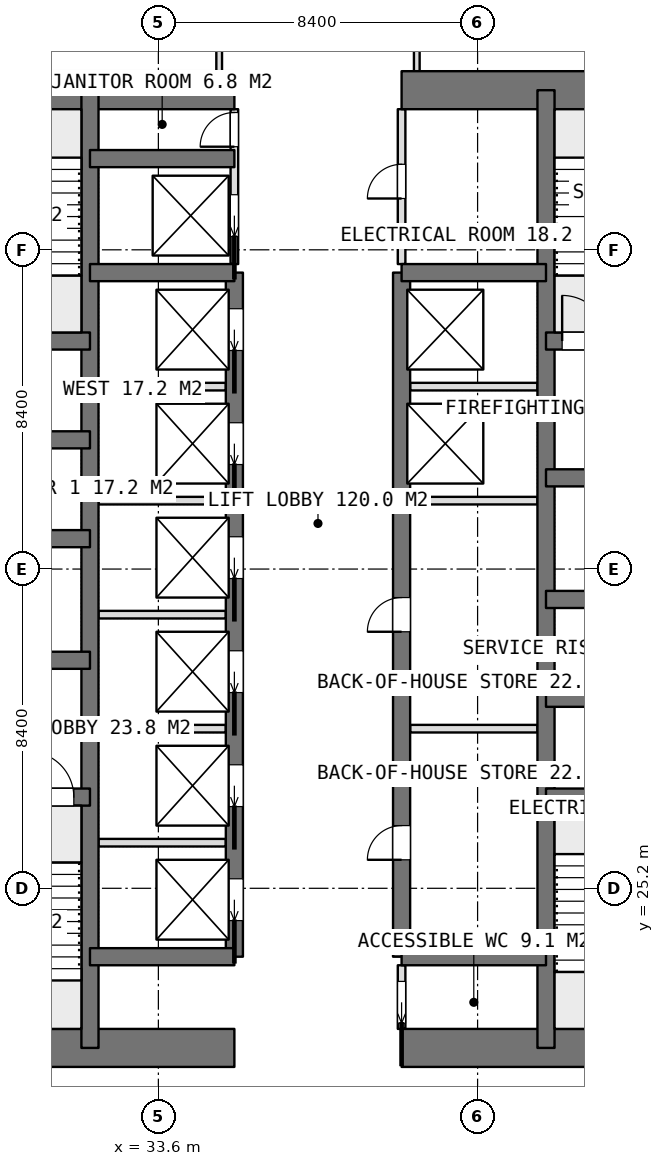
"""IFC4 building model, lengths in metres.
Left out: names, types, materials, properties, quantities, classifications, styles, units other than length and angle.
Written with IfcOpenShell. Run it as: python <this file> out.ifc"""

import sys

from ifc_helpers import new_model, si_unit, direction, frame, frame_2d, origin, place, context, subcontext, project, spatial, rectangle, extrude, element, fill, save


model = new_model("IFC4")
c1 = context("Model", 3, precision=1e-05, world=origin(), true_north=direction((0.0, 1.0)))
c2 = subcontext(c1, "Body", "Model", "MODEL_VIEW")
j1 = project(units=[si_unit("LENGTHUNIT", "METRE"), si_unit("PLANEANGLEUNIT", "RADIAN")], contexts=[c1])
p1 = place(None, origin())
s1 = spatial("IfcSite", under=j1, at=p1, CompositionType="ELEMENT")
p2 = place(p1, origin())
s2 = spatial("IfcBuilding", under=s1, at=p2, CompositionType="ELEMENT")
p3 = place(p2, frame((0.0, 0.0, 195.2)))
s3 = spatial("IfcBuildingStorey", under=s2, at=p3, CompositionType="ELEMENT", Elevation=195.2)
p4 = place(p3, frame((25.2, 21.0, 0.0), z_axis=(0.0, 0.0, 1.0), x_axis=(1.0, 0.0, 0.0)))
e1 = element("IfcWall", 1, at=p4, inside=s3, PredefinedType="SHEAR", context=c2, shape_type="SweptSolid", body=[
    extrude(rectangle(XDim=10.4, YDim=1.0, at=frame_2d((5.2, 0.0))), origin(), (0.0, 0.0, 1.0), 3.75),
])
p5 = place(p3, frame((40.0, 21.0, 0.0), z_axis=(0.0, 0.0, 1.0), x_axis=(1.0, 0.0, 0.0)))
e2 = element("IfcWall", 2, at=p5, inside=s3, PredefinedType="SHEAR", context=c2, shape_type="SweptSolid", body=[
    extrude(rectangle(XDim=10.4, YDim=1.0, at=frame_2d((5.2, 0.0))), origin(), (0.0, 0.0, 1.0), 3.75),
])
p6 = place(p3, frame((25.2, 46.2, 0.0), z_axis=(0.0, 0.0, 1.0), x_axis=(1.0, 0.0, 0.0)))
e3 = element("IfcWall", 3, at=p6, inside=s3, PredefinedType="SHEAR", context=c2, shape_type="SweptSolid", body=[
    extrude(rectangle(XDim=10.4, YDim=1.0, at=frame_2d((5.2, 0.0))), origin(), (0.0, 0.0, 1.0), 3.75),
])
p7 = place(p3, frame((40.0, 46.2, 0.0), z_axis=(0.0, 0.0, 1.0), x_axis=(1.0, 0.0, 0.0)))
e4 = element("IfcWall", 4, at=p7, inside=s3, PredefinedType="SHEAR", context=c2, shape_type="SweptSolid", body=[
    extrude(rectangle(XDim=10.4, YDim=1.0, at=frame_2d((5.2, 0.0))), origin(), (0.0, 0.0, 1.0), 3.75),
])
for number, where, z_axis, x_axis in (
    (5, (31.8, 21.0, 0.0), (0.0, 0.0, 1.0), (0.0, 1.0, 0.0)),
    (6, (43.8, 21.0, 0.0), (0.0, 0.0, 1.0), (0.0, 1.0, 0.0)),
):
    element("IfcWall", number, at=place(p3, frame(where, z_axis=z_axis, x_axis=x_axis)), inside=s3, PredefinedType="SHEAR", context=c2, shape_type="SweptSolid", body=[
        extrude(rectangle(XDim=25.2, YDim=0.45, at=frame_2d((12.6, 0.0))), origin(), (0.0, 0.0, 1.0), 3.75),
    ])
p8 = place(p3, frame((35.6, 23.4, 0.0), z_axis=(0.0, 0.0, 1.0), x_axis=(0.0, 1.0, 0.0)))
e7 = element("IfcWall", 7, at=p8, inside=s3, PredefinedType="SHEAR", context=c2, shape_type="SweptSolid", body=[
    extrude(rectangle(XDim=18.0, YDim=0.45, at=frame_2d((9.0, 0.0))), origin(), (0.0, 0.0, 1.0), 3.75),
])
p9 = place(p8, frame((0.95, 0.0, 0.0)))
e8 = element("IfcOpeningElement", 8, at=p9, cuts=e7, PredefinedType="OPENING", context=c2, shape_type="SweptSolid", body=[
    extrude(rectangle(XDim=1.1, YDim=2.1, at=frame_2d((0.55, 1.05))), frame((0.0, 0.235, 0.0), z_axis=(0.0, -1.0, 0.0), x_axis=(1.0, 0.0, 0.0)), (0.0, 0.0, 1.0), 0.47),
])
p10 = place(p8, frame((3.95, 0.0, 0.0)))
e9 = element("IfcOpeningElement", 9, at=p10, cuts=e7, PredefinedType="OPENING", context=c2, shape_type="SweptSolid", body=[
    extrude(rectangle(XDim=1.1, YDim=2.1, at=frame_2d((0.55, 1.05))), frame((0.0, 0.235, 0.0), z_axis=(0.0, -1.0, 0.0), x_axis=(1.0, 0.0, 0.0)), (0.0, 0.0, 1.0), 0.47),
])
p11 = place(p8, frame((6.95, 0.0, 0.0)))
e10 = element("IfcOpeningElement", 10, at=p11, cuts=e7, PredefinedType="OPENING", context=c2, shape_type="SweptSolid", body=[
    extrude(rectangle(XDim=1.1, YDim=2.1, at=frame_2d((0.55, 1.05))), frame((0.0, 0.235, 0.0), z_axis=(0.0, -1.0, 0.0), x_axis=(1.0, 0.0, 0.0)), (0.0, 0.0, 1.0), 0.47),
])
p12 = place(p8, frame((9.95, 0.0, 0.0)))
e11 = element("IfcOpeningElement", 11, at=p12, cuts=e7, PredefinedType="OPENING", context=c2, shape_type="SweptSolid", body=[
    extrude(rectangle(XDim=1.1, YDim=2.1, at=frame_2d((0.55, 1.05))), frame((0.0, 0.235, 0.0), z_axis=(0.0, -1.0, 0.0), x_axis=(1.0, 0.0, 0.0)), (0.0, 0.0, 1.0), 0.47),
])
p13 = place(p8, frame((12.95, 0.0, 0.0)))
e12 = element("IfcOpeningElement", 12, at=p13, cuts=e7, PredefinedType="OPENING", context=c2, shape_type="SweptSolid", body=[
    extrude(rectangle(XDim=1.1, YDim=2.1, at=frame_2d((0.55, 1.05))), frame((0.0, 0.235, 0.0), z_axis=(0.0, -1.0, 0.0), x_axis=(1.0, 0.0, 0.0)), (0.0, 0.0, 1.0), 0.47),
])
p14 = place(p8, frame((15.95, 0.0, 0.0)))
e13 = element("IfcOpeningElement", 13, at=p14, cuts=e7, PredefinedType="OPENING", context=c2, shape_type="SweptSolid", body=[
    extrude(rectangle(XDim=1.1, YDim=2.1, at=frame_2d((0.55, 1.05))), frame((0.0, 0.235, 0.0), z_axis=(0.0, -1.0, 0.0), x_axis=(1.0, 0.0, 0.0)), (0.0, 0.0, 1.0), 0.47),
])
p15 = place(p3, frame((40.0, 23.4, 0.0), z_axis=(0.0, 0.0, 1.0), x_axis=(0.0, 1.0, 0.0)))
e14 = element("IfcWall", 14, at=p15, inside=s3, PredefinedType="SHEAR", context=c2, shape_type="SweptSolid", body=[
    extrude(rectangle(XDim=18.0, YDim=0.45, at=frame_2d((9.0, 0.0))), origin(), (0.0, 0.0, 1.0), 3.75),
])
p16 = place(p15, frame((2.55, 0.0, 0.0)))
e15 = element("IfcOpeningElement", 15, at=p16, cuts=e14, PredefinedType="OPENING", context=c2, shape_type="SweptSolid", body=[
    extrude(rectangle(XDim=0.9, YDim=2.1, at=frame_2d((0.45, 1.05))), frame((0.0, 0.235, 0.0), z_axis=(0.0, -1.0, 0.0), x_axis=(1.0, 0.0, 0.0)), (0.0, 0.0, 1.0), 0.47),
])
p17 = place(p15, frame((8.55, 0.0, 0.0)))
e16 = element("IfcOpeningElement", 16, at=p17, cuts=e14, PredefinedType="OPENING", context=c2, shape_type="SweptSolid", body=[
    extrude(rectangle(XDim=0.9, YDim=2.1, at=frame_2d((0.45, 1.05))), frame((0.0, 0.235, 0.0), z_axis=(0.0, -1.0, 0.0), x_axis=(1.0, 0.0, 0.0)), (0.0, 0.0, 1.0), 0.47),
])
for number, where, z_axis, x_axis in (
    (17, (31.8, 23.4, 0.0), (0.0, 0.0, 1.0), (1.0, 0.0, 0.0)),
    (18, (31.8, 41.4, 0.0), (0.0, 0.0, 1.0), (1.0, 0.0, 0.0)),
    (19, (31.8, 44.4, 0.0), (0.0, 0.0, 1.0), (1.0, 0.0, 0.0)),
    (20, (40.0, 23.4, 0.0), (0.0, 0.0, 1.0), (1.0, 0.0, 0.0)),
    (21, (40.0, 41.4, 0.0), (0.0, 0.0, 1.0), (1.0, 0.0, 0.0)),
):
    element("IfcWall", number, at=place(p3, frame(where, z_axis=z_axis, x_axis=x_axis)), inside=s3, PredefinedType="SHEAR", context=c2, shape_type="SweptSolid", body=[
        extrude(rectangle(XDim=3.8, YDim=0.45, at=frame_2d((1.9, 0.0))), origin(), (0.0, 0.0, 1.0), 3.75),
    ])
p18 = place(p3, frame((25.2, 27.6, 0.0), z_axis=(0.0, 0.0, 1.0), x_axis=(1.0, 0.0, 0.0)))
e22 = element("IfcWall", 22, at=p18, inside=s3, PredefinedType="SHEAR", context=c2, shape_type="SweptSolid", body=[
    extrude(rectangle(XDim=6.6, YDim=0.45, at=frame_2d((3.3, 0.0))), origin(), (0.0, 0.0, 1.0), 3.75),
])
p19 = place(p18, frame((4.975, 0.0, 0.0)))
e23 = element("IfcOpeningElement", 23, at=p19, cuts=e22, PredefinedType="OPENING", context=c2, shape_type="SweptSolid", body=[
    extrude(rectangle(XDim=1.2, YDim=2.1, at=frame_2d((0.6, 1.05))), frame((0.0, 0.235, 0.0), z_axis=(0.0, -1.0, 0.0), x_axis=(1.0, 0.0, 0.0)), (0.0, 0.0, 1.0), 0.47),
])
p20 = place(p3, frame((25.2, 31.2, 0.0), z_axis=(0.0, 0.0, 1.0), x_axis=(1.0, 0.0, 0.0)))
e24 = element("IfcWall", 24, at=p20, inside=s3, PredefinedType="SHEAR", context=c2, shape_type="SweptSolid", body=[
    extrude(rectangle(XDim=6.6, YDim=0.45, at=frame_2d((3.3, 0.0))), origin(), (0.0, 0.0, 1.0), 3.75),
])
p21 = place(p20, frame((2.65, 0.0, 0.0)))
e25 = element("IfcOpeningElement", 25, at=p21, cuts=e24, PredefinedType="OPENING", context=c2, shape_type="SweptSolid", body=[
    extrude(rectangle(XDim=1.3, YDim=2.1, at=frame_2d((0.65, 1.05))), frame((0.0, 0.235, 0.0), z_axis=(0.0, -1.0, 0.0), x_axis=(1.0, 0.0, 0.0)), (0.0, 0.0, 1.0), 0.47),
])
for number, where, z_axis, x_axis in (
    (26, (25.2, 34.4, 0.0), (0.0, 0.0, 1.0), (1.0, 0.0, 0.0)),
    (27, (25.2, 37.0, 0.0), (0.0, 0.0, 1.0), (1.0, 0.0, 0.0)),
    (28, (25.2, 39.6, 0.0), (0.0, 0.0, 1.0), (1.0, 0.0, 0.0)),
):
    element("IfcWall", number, at=place(p3, frame(where, z_axis=z_axis, x_axis=x_axis)), inside=s3, PredefinedType="SHEAR", context=c2, shape_type="SweptSolid", body=[
        extrude(rectangle(XDim=6.6, YDim=0.45, at=frame_2d((3.3, 0.0))), origin(), (0.0, 0.0, 1.0), 3.75),
    ])
for number, where, z_axis, x_axis in (
    (29, (43.8, 27.6, 0.0), (0.0, 0.0, 1.0), (1.0, 0.0, 0.0)),
    (30, (43.8, 30.2, 0.0), (0.0, 0.0, 1.0), (1.0, 0.0, 0.0)),
    (31, (43.8, 32.8, 0.0), (0.0, 0.0, 1.0), (1.0, 0.0, 0.0)),
):
    element("IfcWall", number, at=place(p3, frame(where, z_axis=z_axis, x_axis=x_axis)), inside=s3, PredefinedType="SHEAR", context=c2, shape_type="SweptSolid", body=[
        extrude(rectangle(XDim=6.6, YDim=0.45, at=frame_2d((3.3, 0.0))), origin(), (0.0, 0.0, 1.0), 3.75),
    ])
p22 = place(p3, frame((43.8, 36.0, 0.0), z_axis=(0.0, 0.0, 1.0), x_axis=(1.0, 0.0, 0.0)))
e32 = element("IfcWall", 32, at=p22, inside=s3, PredefinedType="SHEAR", context=c2, shape_type="SweptSolid", body=[
    extrude(rectangle(XDim=6.6, YDim=0.45, at=frame_2d((3.3, 0.0))), origin(), (0.0, 0.0, 1.0), 3.75),
])
p23 = place(p22, frame((2.65, 0.0, 0.0)))
e33 = element("IfcOpeningElement", 33, at=p23, cuts=e32, PredefinedType="OPENING", context=c2, shape_type="SweptSolid", body=[
    extrude(rectangle(XDim=1.3, YDim=2.1, at=frame_2d((0.65, 1.05))), frame((0.0, 0.235, 0.0), z_axis=(0.0, -1.0, 0.0), x_axis=(1.0, 0.0, 0.0)), (0.0, 0.0, 1.0), 0.47),
])
p24 = place(p3, frame((43.8, 39.6, 0.0), z_axis=(0.0, 0.0, 1.0), x_axis=(1.0, 0.0, 0.0)))
e34 = element("IfcWall", 34, at=p24, inside=s3, PredefinedType="SHEAR", context=c2, shape_type="SweptSolid", body=[
    extrude(rectangle(XDim=6.6, YDim=0.45, at=frame_2d((3.3, 0.0))), origin(), (0.0, 0.0, 1.0), 3.75),
])
p25 = place(p24, frame((0.425, 0.0, 0.0)))
e35 = element("IfcOpeningElement", 35, at=p25, cuts=e34, PredefinedType="OPENING", context=c2, shape_type="SweptSolid", body=[
    extrude(rectangle(XDim=1.2, YDim=2.1, at=frame_2d((0.6, 1.05))), frame((0.0, 0.235, 0.0), z_axis=(0.0, -1.0, 0.0), x_axis=(1.0, 0.0, 0.0)), (0.0, 0.0, 1.0), 0.47),
])
for number, where, z_axis, x_axis in (
    (36, (32.025, 26.4, 0.0), (0.0, 0.0, 1.0), (1.0, 0.0, 0.0)),
    (37, (32.025, 29.4, 0.0), (0.0, 0.0, 1.0), (1.0, 0.0, 0.0)),
    (38, (32.025, 32.4, 0.0), (0.0, 0.0, 1.0), (1.0, 0.0, 0.0)),
    (39, (32.025, 35.4, 0.0), (0.0, 0.0, 1.0), (1.0, 0.0, 0.0)),
    (40, (32.025, 38.4, 0.0), (0.0, 0.0, 1.0), (1.0, 0.0, 0.0)),
):
    element("IfcWall", number, at=place(p3, frame(where, z_axis=z_axis, x_axis=x_axis)), inside=s3, PredefinedType="PARTITIONING", context=c2, shape_type="SweptSolid", body=[
        extrude(rectangle(XDim=3.35, YDim=0.2, at=frame_2d((1.675, 0.0))), origin(), (0.0, 0.0, 1.0), 3.5),
    ])
for number, where, z_axis, x_axis in (
    (41, (40.225, 29.4, 0.0), (0.0, 0.0, 1.0), (1.0, 0.0, 0.0)),
    (42, (40.225, 35.4, 0.0), (0.0, 0.0, 1.0), (1.0, 0.0, 0.0)),
    (43, (40.225, 38.4, 0.0), (0.0, 0.0, 1.0), (1.0, 0.0, 0.0)),
):
    element("IfcWall", number, at=place(p3, frame(where, z_axis=z_axis, x_axis=x_axis)), inside=s3, PredefinedType="PARTITIONING", context=c2, shape_type="SweptSolid", body=[
        extrude(rectangle(XDim=3.35, YDim=0.2, at=frame_2d((1.675, 0.0))), origin(), (0.0, 0.0, 1.0), 3.5),
    ])
p26 = place(p3, frame((40.0, 21.5, 0.0), z_axis=(0.0, 0.0, 1.0), x_axis=(0.0, 1.0, 0.0)))
e44 = element("IfcWall", 44, at=p26, inside=s3, PredefinedType="PARTITIONING", context=c2, shape_type="SweptSolid", body=[
    extrude(rectangle(XDim=1.675, YDim=0.2, at=frame_2d((0.837, 0.0))), origin(), (0.0, 0.0, 1.0), 3.5),
])
p27 = place(p26, frame((0.15, 0.0, 0.0)))
e45 = element("IfcOpeningElement", 45, at=p27, cuts=e44, PredefinedType="OPENING", context=c2, shape_type="SweptSolid", body=[
    extrude(rectangle(XDim=1.1, YDim=2.1, at=frame_2d((0.55, 1.05))), frame((0.0, 0.11, 0.0), z_axis=(0.0, -1.0, 0.0), x_axis=(1.0, 0.0, 0.0)), (0.0, 0.0, 1.0), 0.22),
])
p28 = place(p3, frame((40.0, 41.625, 0.0), z_axis=(0.0, 0.0, 1.0), x_axis=(0.0, 1.0, 0.0)))
e46 = element("IfcWall", 46, at=p28, inside=s3, PredefinedType="PARTITIONING", context=c2, shape_type="SweptSolid", body=[
    extrude(rectangle(XDim=4.075, YDim=0.2, at=frame_2d((2.038, 0.0))), origin(), (0.0, 0.0, 1.0), 3.5),
])
p29 = place(p28, frame((1.725, 0.0, 0.0)))
e47 = element("IfcOpeningElement", 47, at=p29, cuts=e46, PredefinedType="OPENING", context=c2, shape_type="SweptSolid", body=[
    extrude(rectangle(XDim=0.9, YDim=2.1, at=frame_2d((0.45, 1.05))), frame((0.0, 0.11, 0.0), z_axis=(0.0, -1.0, 0.0), x_axis=(1.0, 0.0, 0.0)), (0.0, 0.0, 1.0), 0.22),
])
p30 = place(p3, frame((35.6, 41.625, 0.0), z_axis=(0.0, 0.0, 1.0), x_axis=(0.0, 1.0, 0.0)))
e48 = element("IfcWall", 48, at=p30, inside=s3, PredefinedType="PARTITIONING", context=c2, shape_type="SweptSolid", body=[
    extrude(rectangle(XDim=4.075, YDim=0.2, at=frame_2d((2.038, 0.0))), origin(), (0.0, 0.0, 1.0), 3.5),
])
p31 = place(p30, frame((3.088, 0.0, 0.0)))
e49 = element("IfcOpeningElement", 49, at=p31, cuts=e48, PredefinedType="OPENING", context=c2, shape_type="SweptSolid", body=[
    extrude(rectangle(XDim=0.9, YDim=2.1, at=frame_2d((0.45, 1.05))), frame((0.0, 0.11, 0.0), z_axis=(0.0, -1.0, 0.0), x_axis=(1.0, 0.0, 0.0)), (0.0, 0.0, 1.0), 0.22),
])
p32 = place(p30, frame((0.725, 0.0, 0.0)))
e50 = element("IfcOpeningElement", 50, at=p32, cuts=e48, PredefinedType="OPENING", context=c2, shape_type="SweptSolid", body=[
    extrude(rectangle(XDim=1.1, YDim=2.1, at=frame_2d((0.55, 1.05))), frame((0.0, 0.11, 0.0), z_axis=(0.0, -1.0, 0.0), x_axis=(1.0, 0.0, 0.0)), (0.0, 0.0, 1.0), 0.22),
])
for number, where, z_axis, x_axis in (
    (51, (40.4, 46.7, 0.0), (0.0, 0.0, 1.0), (0.0, 1.0, 0.0)),
    (52, (35.2, 46.7, 0.0), (0.0, 0.0, 1.0), (0.0, 1.0, 0.0)),
):
    element("IfcWall", number, at=place(p3, frame(where, z_axis=z_axis, x_axis=x_axis)), inside=s3, PredefinedType="PARTITIONING", context=c2, shape_type="SweptSolid", body=[
        extrude(rectangle(XDim=2.625, YDim=0.15, at=frame_2d((1.312, 0.0))), origin(), (0.0, 0.0, 1.0), 3.5),
    ])
p33 = place(p27, origin())
e53 = element("IfcDoor", 53, at=p33, inside=s3, OperationType="SLIDING_TO_LEFT", PredefinedType="DOOR", context=c2, shape_type="SweptSolid", body=[
    extrude(rectangle(XDim=1.1, YDim=2.1, at=frame_2d((0.55, 1.05))), frame((0.0, 0.025, 0.0), z_axis=(0.0, -1.0, 0.0), x_axis=(1.0, 0.0, 0.0)), (0.0, 0.0, 1.0), 0.05),
])
fill(e45, e53)
p34 = place(p29, origin())
e54 = element("IfcDoor", 54, at=p34, inside=s3, OperationType="SINGLE_SWING_LEFT", PredefinedType="DOOR", context=c2, shape_type="SweptSolid", body=[
    extrude(rectangle(XDim=0.9, YDim=2.1, at=frame_2d((0.45, 1.05))), frame((0.0, 0.025, 0.0), z_axis=(0.0, -1.0, 0.0), x_axis=(1.0, 0.0, 0.0)), (0.0, 0.0, 1.0), 0.05),
])
fill(e47, e54)
p35 = place(p16, origin())
e55 = element("IfcDoor", 55, at=p35, inside=s3, OperationType="SINGLE_SWING_LEFT", PredefinedType="DOOR", context=c2, shape_type="SweptSolid", body=[
    extrude(rectangle(XDim=0.9, YDim=2.1, at=frame_2d((0.45, 1.05))), frame((0.0, 0.025, 0.0), z_axis=(0.0, -1.0, 0.0), x_axis=(1.0, 0.0, 0.0)), (0.0, 0.0, 1.0), 0.05),
])
fill(e15, e55)
p36 = place(p17, origin())
e56 = element("IfcDoor", 56, at=p36, inside=s3, OperationType="SINGLE_SWING_LEFT", PredefinedType="DOOR", context=c2, shape_type="SweptSolid", body=[
    extrude(rectangle(XDim=0.9, YDim=2.1, at=frame_2d((0.45, 1.05))), frame((0.0, 0.025, 0.0), z_axis=(0.0, -1.0, 0.0), x_axis=(1.0, 0.0, 0.0)), (0.0, 0.0, 1.0), 0.05),
])
fill(e16, e56)
p37 = place(p31, origin())
e57 = element("IfcDoor", 57, at=p37, inside=s3, OperationType="SINGLE_SWING_LEFT", PredefinedType="DOOR", context=c2, shape_type="SweptSolid", body=[
    extrude(rectangle(XDim=0.9, YDim=2.1, at=frame_2d((0.45, 1.05))), frame((0.0, 0.025, 0.0), z_axis=(0.0, -1.0, 0.0), x_axis=(1.0, 0.0, 0.0)), (0.0, 0.0, 1.0), 0.05),
])
fill(e49, e57)
p38 = place(p9, origin())
e58 = element("IfcDoor", 58, at=p38, inside=s3, OperationType="SLIDING_TO_LEFT", PredefinedType="USERDEFINED", context=c2, shape_type="SweptSolid", body=[
    extrude(rectangle(XDim=1.1, YDim=2.1, at=frame_2d((0.55, 1.05))), frame((0.0, 0.025, 0.0), z_axis=(0.0, -1.0, 0.0), x_axis=(1.0, 0.0, 0.0)), (0.0, 0.0, 1.0), 0.05),
])
fill(e8, e58)
p39 = place(p10, origin())
e59 = element("IfcDoor", 59, at=p39, inside=s3, OperationType="SLIDING_TO_LEFT", PredefinedType="USERDEFINED", context=c2, shape_type="SweptSolid", body=[
    extrude(rectangle(XDim=1.1, YDim=2.1, at=frame_2d((0.55, 1.05))), frame((0.0, 0.025, 0.0), z_axis=(0.0, -1.0, 0.0), x_axis=(1.0, 0.0, 0.0)), (0.0, 0.0, 1.0), 0.05),
])
fill(e9, e59)
p40 = place(p11, origin())
e60 = element("IfcDoor", 60, at=p40, inside=s3, OperationType="SLIDING_TO_LEFT", PredefinedType="USERDEFINED", context=c2, shape_type="SweptSolid", body=[
    extrude(rectangle(XDim=1.1, YDim=2.1, at=frame_2d((0.55, 1.05))), frame((0.0, 0.025, 0.0), z_axis=(0.0, -1.0, 0.0), x_axis=(1.0, 0.0, 0.0)), (0.0, 0.0, 1.0), 0.05),
])
fill(e10, e60)
p41 = place(p12, origin())
e61 = element("IfcDoor", 61, at=p41, inside=s3, OperationType="SLIDING_TO_LEFT", PredefinedType="USERDEFINED", context=c2, shape_type="SweptSolid", body=[
    extrude(rectangle(XDim=1.1, YDim=2.1, at=frame_2d((0.55, 1.05))), frame((0.0, 0.025, 0.0), z_axis=(0.0, -1.0, 0.0), x_axis=(1.0, 0.0, 0.0)), (0.0, 0.0, 1.0), 0.05),
])
fill(e11, e61)
p42 = place(p13, origin())
e62 = element("IfcDoor", 62, at=p42, inside=s3, OperationType="SLIDING_TO_LEFT", PredefinedType="USERDEFINED", context=c2, shape_type="SweptSolid", body=[
    extrude(rectangle(XDim=1.1, YDim=2.1, at=frame_2d((0.55, 1.05))), frame((0.0, 0.025, 0.0), z_axis=(0.0, -1.0, 0.0), x_axis=(1.0, 0.0, 0.0)), (0.0, 0.0, 1.0), 0.05),
])
fill(e12, e62)
p43 = place(p14, origin())
e63 = element("IfcDoor", 63, at=p43, inside=s3, OperationType="SLIDING_TO_LEFT", PredefinedType="USERDEFINED", context=c2, shape_type="SweptSolid", body=[
    extrude(rectangle(XDim=1.1, YDim=2.1, at=frame_2d((0.55, 1.05))), frame((0.0, 0.025, 0.0), z_axis=(0.0, -1.0, 0.0), x_axis=(1.0, 0.0, 0.0)), (0.0, 0.0, 1.0), 0.05),
])
fill(e13, e63)
p44 = place(p32, origin())
e64 = element("IfcDoor", 64, at=p44, inside=s3, OperationType="SLIDING_TO_LEFT", PredefinedType="USERDEFINED", context=c2, shape_type="SweptSolid", body=[
    extrude(rectangle(XDim=1.1, YDim=2.1, at=frame_2d((0.55, 1.05))), frame((0.0, 0.025, 0.0), z_axis=(0.0, -1.0, 0.0), x_axis=(1.0, 0.0, 0.0)), (0.0, 0.0, 1.0), 0.05),
])
fill(e50, e64)
p45 = place(p19, origin())
e65 = element("IfcDoor", 65, at=p45, inside=s3, OperationType="SINGLE_SWING_RIGHT", PredefinedType="DOOR", context=c2, shape_type="SweptSolid", body=[
    extrude(rectangle(XDim=1.2, YDim=2.1, at=frame_2d((0.6, 1.05))), frame((0.0, 0.025, 0.0), z_axis=(0.0, -1.0, 0.0), x_axis=(1.0, 0.0, 0.0)), (0.0, 0.0, 1.0), 0.05),
])
fill(e23, e65)
p46 = place(p25, origin())
e66 = element("IfcDoor", 66, at=p46, inside=s3, OperationType="SINGLE_SWING_RIGHT", PredefinedType="DOOR", context=c2, shape_type="SweptSolid", body=[
    extrude(rectangle(XDim=1.2, YDim=2.1, at=frame_2d((0.6, 1.05))), frame((0.0, 0.025, 0.0), z_axis=(0.0, -1.0, 0.0), x_axis=(1.0, 0.0, 0.0)), (0.0, 0.0, 1.0), 0.05),
])
fill(e35, e66)
save(model, sys.argv[1])
